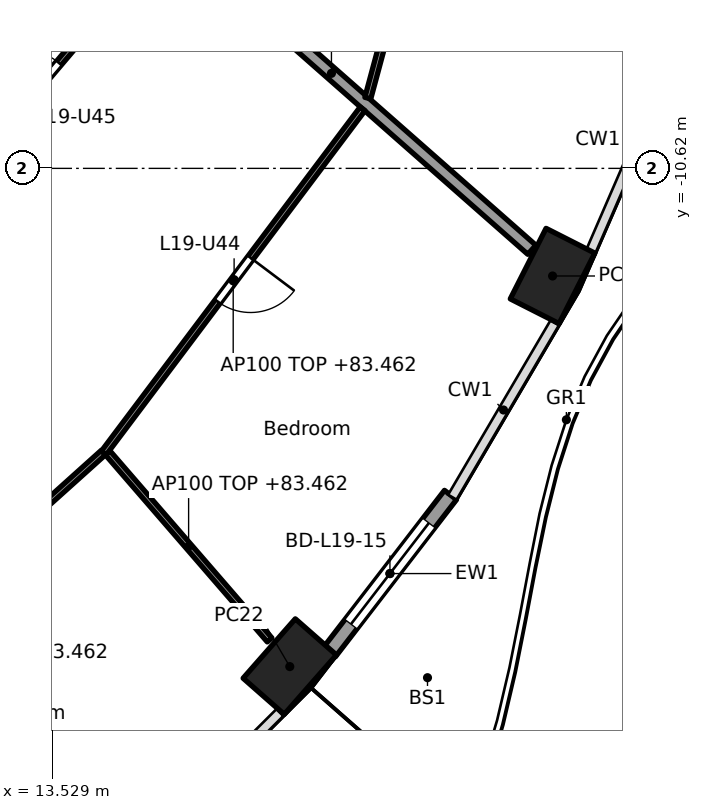
"""IFC4 building model, lengths in metres.
Left out: names, types, materials, properties, quantities, classifications, styles, units other than length and angle.
Written with IfcOpenShell. Run it as: python <this file> out.ifc"""

import sys

from ifc_helpers import new_model, si_unit, direction, frame, frame_2d, origin, origin_2d, place, context, subcontext, project, spatial, rectangle, hollow_rectangle, extrude, element, fill, save


model = new_model("IFC4")
c1 = context("Model", 3, precision=1e-05, world=origin(), true_north=direction((0.0, 1.0)))
c2 = subcontext(c1, "Body", "Model", "MODEL_VIEW")
j1 = project(units=[si_unit("LENGTHUNIT", "METRE"), si_unit("PLANEANGLEUNIT", "RADIAN")], contexts=[c1])
p1 = place(None, origin())
s1 = spatial("IfcSite", under=j1, at=p1, CompositionType="ELEMENT")
p2 = place(p1, origin())
s2 = spatial("IfcBuilding", under=s1, at=p2, CompositionType="ELEMENT")
p3 = place(p2, frame((0.0, 0.0, 80.7)))
s3 = spatial("IfcBuildingStorey", under=s2, at=p3, CompositionType="ELEMENT", Elevation=80.7)
for number, where, z_axis, x_axis in (
    (1, (17.43, -18.813, 0.0), (0.0, 0.0, 1.0), (0.66, 0.751, 0.0)),
    (2, (21.751, -12.39, 0.0), (0.0, 0.0, 1.0), (0.452, 0.892, 0.0)),
):
    element("IfcColumn", number, at=place(p3, frame(where, z_axis=z_axis, x_axis=x_axis)), inside=s3, PredefinedType="COLUMN", context=c2, shape_type="SweptSolid", body=[
        extrude(hollow_rectangle(XDim=1.3, YDim=0.9, WallThickness=0.045, at=origin_2d()), origin(), (0.0, 0.0, 1.0), 3.7),
    ])
p4 = place(p3, frame((20.073, -15.991, 0.0), z_axis=(0.0, 0.0, 1.0), x_axis=(-0.610458970322, -0.792047880847, 0.0)))
e3 = element("IfcWall", 3, at=p4, inside=s3, PredefinedType="SOLIDWALL", context=c2, shape_type="SweptSolid", body=[
    extrude(rectangle(XDim=3.263, YDim=0.25, at=frame_2d((1.631, 0.0))), origin(), (0.0, 0.0, 1.0), 3.44),
])
p5 = place(p4, frame((0.582, 0.0, 0.0)))
e4 = element("IfcOpeningElement", 4, at=p5, cuts=e3, PredefinedType="OPENING", context=c2, shape_type="SweptSolid", body=[
    extrude(rectangle(XDim=2.1, YDim=2.4, at=frame_2d((1.05, 1.2))), frame((0.0, 0.135, 0.0), z_axis=(0.0, -1.0, 0.0), x_axis=(1.0, 0.0, 0.0)), (0.0, 0.0, 1.0), 0.27),
])
p6 = place(p3, frame((14.82, -6.156, 0.0), z_axis=(0.0, 0.0, 1.0), x_axis=(0.750582231659, -0.660777052808, 0.0)))
e5 = element("IfcWall", 5, at=p6, inside=s3, PredefinedType="PARTITIONING", context=c2, shape_type="SweptSolid", body=[
    extrude(rectangle(XDim=8.781, YDim=0.2, at=frame_2d((4.391, 0.0))), origin(), (0.0, 0.0, 1.0), 2.762),
])
p7 = place(p3, frame((9.272, -19.868, 0.0), z_axis=(0.0, 0.0, 1.0), x_axis=(0.743884413566, 0.668308296562, 0.0)))
e6 = element("IfcWall", 6, at=p7, inside=s3, PredefinedType="PARTITIONING", context=c2, shape_type="SweptSolid", body=[
    extrude(rectangle(XDim=6.845, YDim=0.1, at=frame_2d((3.423, 0.0))), origin(), (0.0, 0.0, 1.0), 2.762),
])
p8 = place(p3, frame((11.255, -11.699, 0.0), z_axis=(0.0, 0.0, 1.0), x_axis=(0.646107653745, 0.763246290375, 0.0)))
e7 = element("IfcWall", 7, at=p8, inside=s3, PredefinedType="PARTITIONING", context=c2, shape_type="SweptSolid", body=[
    extrude(rectangle(XDim=6.417, YDim=0.1, at=frame_2d((3.208, 0.0))), origin(), (0.0, 0.0, 1.0), 2.762),
])
p9 = place(p8, frame((2.784, 0.0, 0.0)))
e8 = element("IfcOpeningElement", 8, at=p9, cuts=e7, PredefinedType="OPENING", context=c2, shape_type="SweptSolid", body=[
    extrude(rectangle(XDim=0.9, YDim=2.1, at=frame_2d((0.45, 1.05))), frame((0.0, 0.06, 0.0), z_axis=(0.0, -1.0, 0.0), x_axis=(1.0, 0.0, 0.0)), (0.0, 0.0, 1.0), 0.12),
])
p10 = place(p3, frame((14.435, -15.297, 0.0), z_axis=(0.0, 0.0, 1.0), x_axis=(0.654405107766, -0.756144136345, 0.0)))
e9 = element("IfcWall", 9, at=p10, inside=s3, PredefinedType="PARTITIONING", context=c2, shape_type="SweptSolid", body=[
    extrude(rectangle(XDim=4.07, YDim=0.1, at=frame_2d((2.035, 0.0))), origin(), (0.0, 0.0, 1.0), 2.762),
])
p11 = place(p3, frame((14.372, -15.3, 0.0), z_axis=(0.0, 0.0, 1.0), x_axis=(0.600987107857, 0.79925871668, 0.0)))
e10 = element("IfcWall", 10, at=p11, inside=s3, PredefinedType="PARTITIONING", context=c2, shape_type="SweptSolid", body=[
    extrude(rectangle(XDim=7.08, YDim=0.1, at=frame_2d((3.54, 0.0))), origin(), (0.0, 0.0, 1.0), 2.762),
])
p12 = place(p11, frame((3.115, 0.0, 0.0)))
e11 = element("IfcOpeningElement", 11, at=p12, cuts=e10, PredefinedType="OPENING", context=c2, shape_type="SweptSolid", body=[
    extrude(rectangle(XDim=0.9, YDim=2.1, at=frame_2d((0.45, 1.05))), frame((0.0, 0.06, 0.0), z_axis=(0.0, -1.0, 0.0), x_axis=(1.0, 0.0, 0.0)), (0.0, 0.0, 1.0), 0.12),
])
p13 = place(p3, frame((18.713, -9.464, 0.0), z_axis=(0.0, 0.0, 1.0), x_axis=(0.260279646259, 0.965533275316, 0.0)))
e12 = element("IfcWall", 12, at=p13, inside=s3, PredefinedType="PARTITIONING", context=c2, shape_type="SweptSolid", body=[
    extrude(rectangle(XDim=5.833, YDim=0.1, at=frame_2d((2.917, 0.0))), origin(), (0.0, 0.0, 1.0), 2.762),
])
p14 = place(p5, origin())
e13 = element("IfcDoor", 13, at=p14, inside=s3, OperationType="SLIDING_TO_LEFT", PredefinedType="DOOR", context=c2, shape_type="SweptSolid", body=[
    extrude(rectangle(XDim=2.1, YDim=2.4, at=frame_2d((1.05, 1.2))), frame((0.0, 0.025, 0.0), z_axis=(0.0, -1.0, 0.0), x_axis=(1.0, 0.0, 0.0)), (0.0, 0.0, 1.0), 0.05),
])
fill(e4, e13)
p15 = place(p12, frame((0.9, 0.0, 0.0), x_axis=(-1.0, 0.0, 0.0)))
e14 = element("IfcDoor", 14, at=p15, inside=s3, OperationType="SINGLE_SWING_LEFT", PredefinedType="DOOR", context=c2, shape_type="SweptSolid", body=[
    extrude(rectangle(XDim=0.9, YDim=2.1, at=frame_2d((0.45, 1.05))), frame((0.0, 0.025, 0.0), z_axis=(0.0, -1.0, 0.0), x_axis=(1.0, 0.0, 0.0)), (0.0, 0.0, 1.0), 0.05),
])
fill(e11, e14)
p16 = place(p9, origin())
e15 = element("IfcDoor", 15, at=p16, inside=s3, OperationType="SINGLE_SWING_LEFT", PredefinedType="DOOR", context=c2, shape_type="SweptSolid", body=[
    extrude(rectangle(XDim=0.9, YDim=2.1, at=frame_2d((0.45, 1.05))), frame((0.0, 0.025, 0.0), z_axis=(0.0, -1.0, 0.0), x_axis=(1.0, 0.0, 0.0)), (0.0, 0.0, 1.0), 0.05),
])
fill(e8, e15)
save(model, sys.argv[1])
